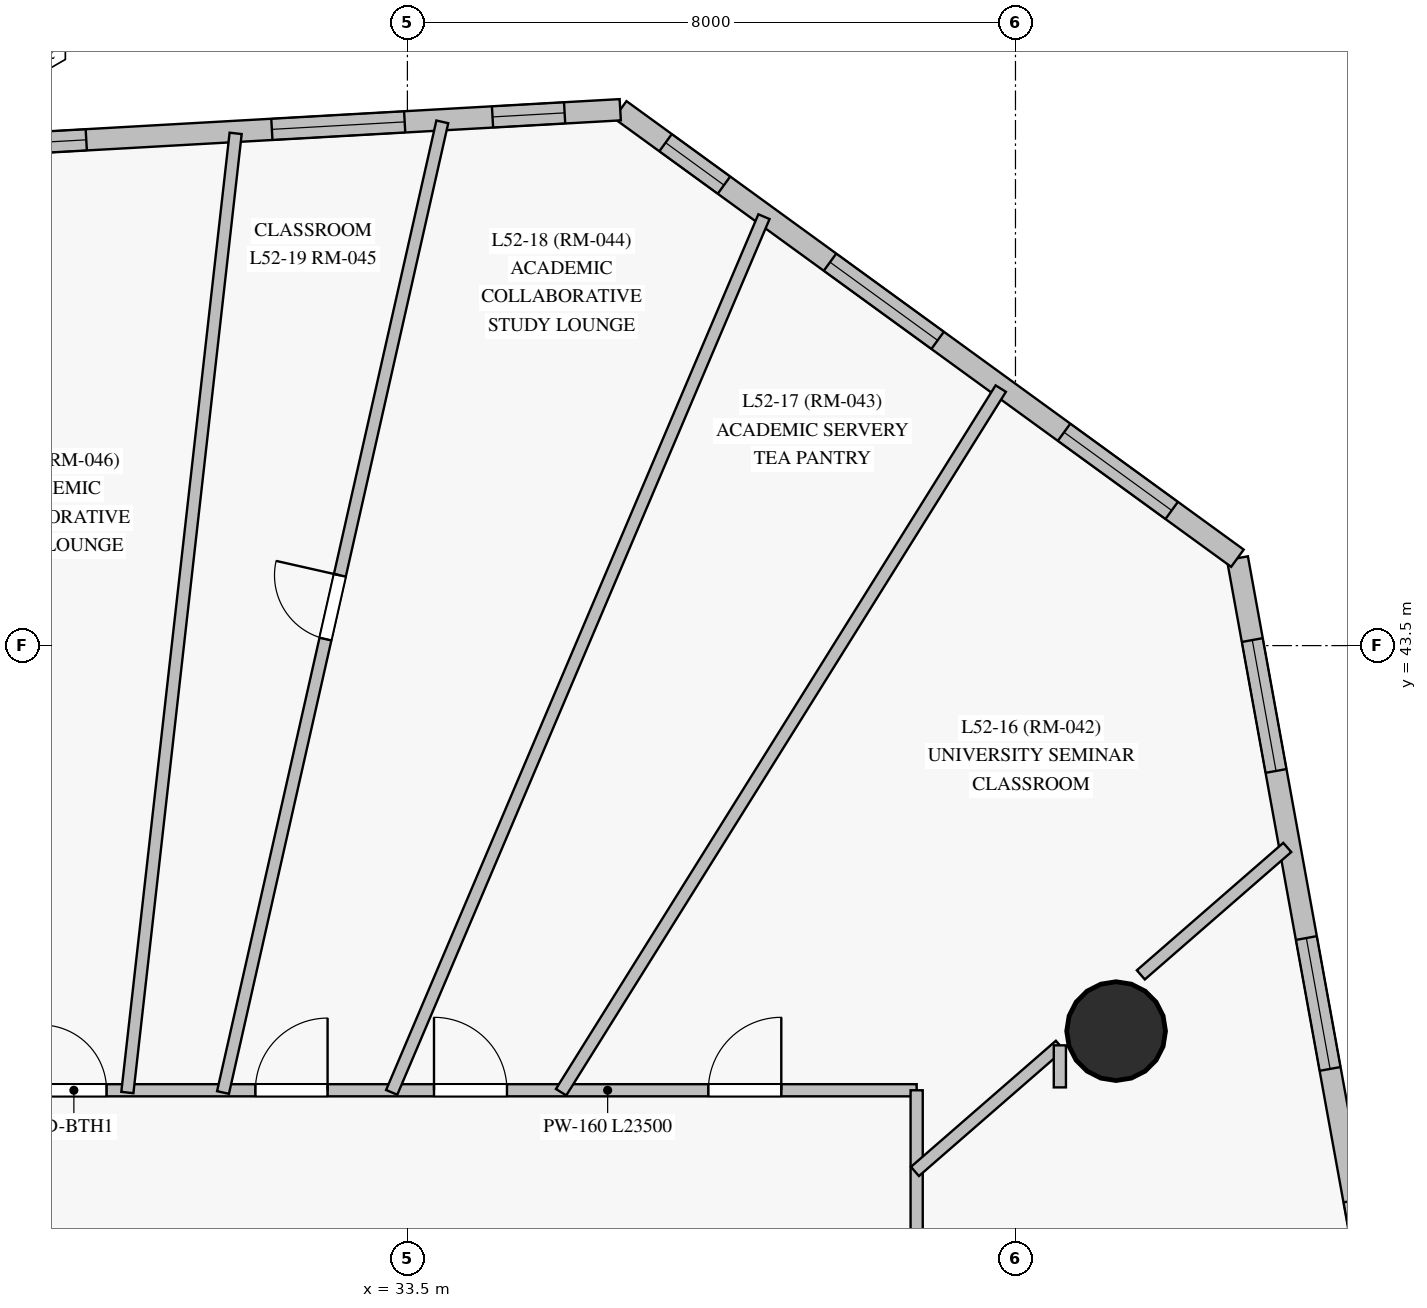
"""IFC4 building model, lengths in metres.
Left out: names, types, materials, properties, quantities, classifications, styles, units other than length and angle.
Written with IfcOpenShell. Run it as: python <this file> out.ifc"""

import sys

from ifc_helpers import new_model, si_unit, direction, frame, frame_2d, origin, origin_with_axes, origin_2d, place, context, subcontext, project, spatial, rectangle, circle, extrude, source, transform, mapped, element, fill, save


model = new_model("IFC4")
c1 = context("Model", 3, precision=1e-05, world=origin(), true_north=direction((0.0, 1.0)))
c2 = subcontext(c1, "Body", "Model", "MODEL_VIEW")
j1 = project(units=[si_unit("LENGTHUNIT", "METRE"), si_unit("PLANEANGLEUNIT", "RADIAN")], contexts=[c1])
p1 = place(None, origin())
s1 = spatial("IfcSite", under=j1, at=p1, CompositionType="ELEMENT")
p2 = place(p1, origin())
s2 = spatial("IfcBuilding", under=s1, at=p2, CompositionType="ELEMENT")
p3 = place(p2, frame((0.0, 0.0, 180.95)))
s3 = spatial("IfcBuildingStorey", under=s2, at=p3, CompositionType="ELEMENT", Elevation=180.95)
m1 = source(origin_with_axes(), c2, "Body", "SweptSolid", [
    extrude(circle(Radius=0.65, at=origin_2d()), origin(), (0.0, 0.0, 1.0), 3.05),
])
p4 = place(p3, frame((42.824, 38.428, 0.0), z_axis=(0.0, 0.0, 1.0), x_axis=(1.0, 0.0, 0.0)))
e1 = element("IfcColumn", 1, at=p4, inside=s3, PredefinedType="COLUMN", context=c2, shape_type="MappedRepresentation", body=[
    mapped(m1, transform((0.0, 0.0, 0.0), scale=1.0)),
])
p5 = place(p3, frame((46.966, 30.618, 0.0), z_axis=(0.0, 0.0, 1.0), x_axis=(-0.178507284688, 0.983938590214, 0.0)))
e2 = element("IfcWall", 2, at=p5, inside=s3, PredefinedType="SOLIDWALL", context=c2, shape_type="SweptSolid", body=[
    extrude(rectangle(XDim=14.261, YDim=0.28, at=frame_2d((7.13, 0.0))), origin(), (0.0, 0.0, 1.0), 2.825),
])
p6 = place(p5, frame((0.517, 0.0, 0.85)))
e3 = element("IfcOpeningElement", 3, at=p6, cuts=e2, PredefinedType="OPENING", context=c2, shape_type="SweptSolid", body=[
    extrude(rectangle(XDim=1.75, YDim=1.65, at=frame_2d((0.875, 0.825))), frame((0.0, 0.15, 0.0), z_axis=(0.0, -1.0, 0.0), x_axis=(1.0, 0.0, 0.0)), (0.0, 0.0, 1.0), 0.3),
])
p7 = place(p5, frame((3.923, 0.0, 0.85)))
e4 = element("IfcOpeningElement", 4, at=p7, cuts=e2, PredefinedType="OPENING", context=c2, shape_type="SweptSolid", body=[
    extrude(rectangle(XDim=1.75, YDim=1.65, at=frame_2d((0.875, 0.825))), frame((0.0, 0.15, 0.0), z_axis=(0.0, -1.0, 0.0), x_axis=(1.0, 0.0, 0.0)), (0.0, 0.0, 1.0), 0.3),
])
p8 = place(p5, frame((7.432, 0.0, 0.85)))
e5 = element("IfcOpeningElement", 5, at=p8, cuts=e2, PredefinedType="OPENING", context=c2, shape_type="SweptSolid", body=[
    extrude(rectangle(XDim=1.75, YDim=1.65, at=frame_2d((0.875, 0.825))), frame((0.0, 0.15, 0.0), z_axis=(0.0, -1.0, 0.0), x_axis=(1.0, 0.0, 0.0)), (0.0, 0.0, 1.0), 0.3),
])
p9 = place(p5, frame((11.416, 0.0, 0.85)))
e6 = element("IfcOpeningElement", 6, at=p9, cuts=e2, PredefinedType="OPENING", context=c2, shape_type="SweptSolid", body=[
    extrude(rectangle(XDim=1.75, YDim=1.65, at=frame_2d((0.875, 0.825))), frame((0.0, 0.15, 0.0), z_axis=(0.0, -1.0, 0.0), x_axis=(1.0, 0.0, 0.0)), (0.0, 0.0, 1.0), 0.3),
])
p10 = place(p3, frame((44.42, 44.65, 0.0), z_axis=(0.0, 0.0, 1.0), x_axis=(-0.808983194654, 0.587831770805, 0.0)))
e7 = element("IfcWall", 7, at=p10, inside=s3, PredefinedType="SOLIDWALL", context=c2, shape_type="SweptSolid", body=[
    extrude(rectangle(XDim=10.037, YDim=0.28, at=frame_2d((5.019, 0.0))), origin(), (0.0, 0.0, 1.0), 2.825),
])
p11 = place(p10, frame((1.069, 0.0, 0.85)))
e8 = element("IfcOpeningElement", 8, at=p11, cuts=e7, PredefinedType="OPENING", context=c2, shape_type="SweptSolid", body=[
    extrude(rectangle(XDim=1.75, YDim=1.65, at=frame_2d((0.875, 0.825))), frame((0.0, 0.15, 0.0), z_axis=(0.0, -1.0, 0.0), x_axis=(1.0, 0.0, 0.0)), (0.0, 0.0, 1.0), 0.3),
])
p12 = place(p10, frame((4.875, 0.0, 0.85)))
e9 = element("IfcOpeningElement", 9, at=p12, cuts=e7, PredefinedType="OPENING", context=c2, shape_type="SweptSolid", body=[
    extrude(rectangle(XDim=1.75, YDim=1.65, at=frame_2d((0.875, 0.825))), frame((0.0, 0.15, 0.0), z_axis=(0.0, -1.0, 0.0), x_axis=(1.0, 0.0, 0.0)), (0.0, 0.0, 1.0), 0.3),
])
p13 = place(p10, frame((8.35, 0.0, 0.85)))
e10 = element("IfcOpeningElement", 10, at=p13, cuts=e7, PredefinedType="OPENING", context=c2, shape_type="SweptSolid", body=[
    extrude(rectangle(XDim=0.95, YDim=1.5, at=frame_2d((0.475, 0.75))), frame((0.0, 0.15, 0.0), z_axis=(0.0, -1.0, 0.0), x_axis=(1.0, 0.0, 0.0)), (0.0, 0.0, 1.0), 0.3),
])
p14 = place(p3, frame((36.3, 50.55, 0.0), z_axis=(0.0, 0.0, 1.0), x_axis=(-0.998416329784, -0.056256843315, 0.0)))
e11 = element("IfcWall", 11, at=p14, inside=s3, PredefinedType="SOLIDWALL", context=c2, shape_type="SweptSolid", body=[
    extrude(rectangle(XDim=12.837, YDim=0.28, at=frame_2d((6.418, 0.0))), origin(), (0.0, 0.0, 1.0), 2.825),
])
p15 = place(p14, frame((0.733, 0.0, 0.85)))
e12 = element("IfcOpeningElement", 12, at=p15, cuts=e11, PredefinedType="OPENING", context=c2, shape_type="SweptSolid", body=[
    extrude(rectangle(XDim=0.95, YDim=1.5, at=frame_2d((0.475, 0.75))), frame((0.0, 0.15, 0.0), z_axis=(0.0, -1.0, 0.0), x_axis=(1.0, 0.0, 0.0)), (0.0, 0.0, 1.0), 0.3),
])
p16 = place(p14, frame((2.841, 0.0, 0.85)))
e13 = element("IfcOpeningElement", 13, at=p16, cuts=e11, PredefinedType="OPENING", context=c2, shape_type="SweptSolid", body=[
    extrude(rectangle(XDim=1.75, YDim=1.65, at=frame_2d((0.875, 0.825))), frame((0.0, 0.15, 0.0), z_axis=(0.0, -1.0, 0.0), x_axis=(1.0, 0.0, 0.0)), (0.0, 0.0, 1.0), 0.3),
])
p17 = place(p14, frame((7.036, 0.0, 0.85)))
e14 = element("IfcOpeningElement", 14, at=p17, cuts=e11, PredefinedType="OPENING", context=c2, shape_type="SweptSolid", body=[
    extrude(rectangle(XDim=1.75, YDim=1.65, at=frame_2d((0.875, 0.825))), frame((0.0, 0.15, 0.0), z_axis=(0.0, -1.0, 0.0), x_axis=(1.0, 0.0, 0.0)), (0.0, 0.0, 1.0), 0.3),
])
p18 = place(p3, frame((16.7, 37.65, 0.0), z_axis=(0.0, 0.0, 1.0), x_axis=(1.0, 0.0, 0.0)))
e15 = element("IfcWall", 15, at=p18, inside=s3, PredefinedType="PARTITIONING", context=c2, shape_type="SweptSolid", body=[
    extrude(rectangle(XDim=23.5, YDim=0.16, at=frame_2d((11.75, 0.0))), origin(), (0.0, 0.0, 1.0), 2.375),
])
p19 = place(p18, frame((20.759, 0.0, 0.0)))
e16 = element("IfcOpeningElement", 16, at=p19, cuts=e15, PredefinedType="OPENING", context=c2, shape_type="SweptSolid", body=[
    extrude(rectangle(XDim=0.96, YDim=2.15, at=frame_2d((0.48, 1.075))), frame((0.0, 0.09, 0.0), z_axis=(0.0, -1.0, 0.0), x_axis=(1.0, 0.0, 0.0)), (0.0, 0.0, 1.0), 0.18),
])
p20 = place(p18, frame((17.15, 0.0, 0.0)))
e17 = element("IfcOpeningElement", 17, at=p20, cuts=e15, PredefinedType="OPENING", context=c2, shape_type="SweptSolid", body=[
    extrude(rectangle(XDim=0.96, YDim=2.15, at=frame_2d((0.48, 1.075))), frame((0.0, 0.09, 0.0), z_axis=(0.0, -1.0, 0.0), x_axis=(1.0, 0.0, 0.0)), (0.0, 0.0, 1.0), 0.18),
])
p21 = place(p18, frame((14.8, 0.0, 0.0)))
e18 = element("IfcOpeningElement", 18, at=p21, cuts=e15, PredefinedType="OPENING", context=c2, shape_type="SweptSolid", body=[
    extrude(rectangle(XDim=0.95, YDim=2.15, at=frame_2d((0.475, 1.075))), frame((0.0, 0.09, 0.0), z_axis=(0.0, -1.0, 0.0), x_axis=(1.0, 0.0, 0.0)), (0.0, 0.0, 1.0), 0.18),
])
p22 = place(p18, frame((11.982, 0.0, 0.0)))
e19 = element("IfcOpeningElement", 19, at=p22, cuts=e15, PredefinedType="OPENING", context=c2, shape_type="SweptSolid", body=[
    extrude(rectangle(XDim=0.86, YDim=2.1, at=frame_2d((0.43, 1.05))), frame((0.0, 0.09, 0.0), z_axis=(0.0, -1.0, 0.0), x_axis=(1.0, 0.0, 0.0)), (0.0, 0.0, 1.0), 0.18),
])
p23 = place(p18, frame((10.885, 0.0, 0.0)))
e20 = element("IfcOpeningElement", 20, at=p23, cuts=e15, PredefinedType="OPENING", context=c2, shape_type="SweptSolid", body=[
    extrude(rectangle(XDim=0.95, YDim=2.15, at=frame_2d((0.475, 1.075))), frame((0.0, 0.09, 0.0), z_axis=(0.0, -1.0, 0.0), x_axis=(1.0, 0.0, 0.0)), (0.0, 0.0, 1.0), 0.18),
])
p24 = place(p18, frame((7.89, 0.0, 0.0)))
e21 = element("IfcOpeningElement", 21, at=p24, cuts=e15, PredefinedType="OPENING", context=c2, shape_type="SweptSolid", body=[
    extrude(rectangle(XDim=0.96, YDim=2.15, at=frame_2d((0.48, 1.075))), frame((0.0, 0.09, 0.0), z_axis=(0.0, -1.0, 0.0), x_axis=(1.0, 0.0, 0.0)), (0.0, 0.0, 1.0), 0.18),
])
p25 = place(p18, frame((5.4, 0.0, 0.0)))
e22 = element("IfcOpeningElement", 22, at=p25, cuts=e15, PredefinedType="OPENING", context=c2, shape_type="SweptSolid", body=[
    extrude(rectangle(XDim=0.96, YDim=2.15, at=frame_2d((0.48, 1.075))), frame((0.0, 0.09, 0.0), z_axis=(0.0, -1.0, 0.0), x_axis=(1.0, 0.0, 0.0)), (0.0, 0.0, 1.0), 0.18),
])
p26 = place(p18, frame((1.939, 0.0, 0.0)))
e23 = element("IfcOpeningElement", 23, at=p26, cuts=e15, PredefinedType="OPENING", context=c2, shape_type="SweptSolid", body=[
    extrude(rectangle(XDim=0.96, YDim=2.15, at=frame_2d((0.48, 1.075))), frame((0.0, 0.09, 0.0), z_axis=(0.0, -1.0, 0.0), x_axis=(1.0, 0.0, 0.0)), (0.0, 0.0, 1.0), 0.18),
])
p27 = place(p3, frame((40.2, 37.65, 0.0), z_axis=(0.0, 0.0, 1.0), x_axis=(0.0, -1.0, 0.0)))
e24 = element("IfcWall", 24, at=p27, inside=s3, PredefinedType="PARTITIONING", context=c2, shape_type="SweptSolid", body=[
    extrude(rectangle(XDim=22.3, YDim=0.16, at=frame_2d((11.15, 0.0))), origin(), (0.0, 0.0, 1.0), 2.375),
])
p28 = place(p27, frame((18.619, 0.0, 0.0)))
e25 = element("IfcOpeningElement", 25, at=p28, cuts=e24, PredefinedType="OPENING", context=c2, shape_type="SweptSolid", body=[
    extrude(rectangle(XDim=0.96, YDim=2.15, at=frame_2d((0.48, 1.075))), frame((0.0, 0.09, 0.0), z_axis=(0.0, -1.0, 0.0), x_axis=(1.0, 0.0, 0.0)), (0.0, 0.0, 1.0), 0.18),
])
p29 = place(p27, frame((16.25, 0.0, 0.0)))
e26 = element("IfcOpeningElement", 26, at=p29, cuts=e24, PredefinedType="OPENING", context=c2, shape_type="SweptSolid", body=[
    extrude(rectangle(XDim=0.96, YDim=2.15, at=frame_2d((0.48, 1.075))), frame((0.0, 0.09, 0.0), z_axis=(0.0, -1.0, 0.0), x_axis=(1.0, 0.0, 0.0)), (0.0, 0.0, 1.0), 0.18),
])
p30 = place(p27, frame((10.675, 0.0, 0.0)))
e27 = element("IfcOpeningElement", 27, at=p30, cuts=e24, PredefinedType="OPENING", context=c2, shape_type="SweptSolid", body=[
    extrude(rectangle(XDim=0.96, YDim=2.15, at=frame_2d((0.48, 1.075))), frame((0.0, 0.09, 0.0), z_axis=(0.0, -1.0, 0.0), x_axis=(1.0, 0.0, 0.0)), (0.0, 0.0, 1.0), 0.18),
])
p31 = place(p27, frame((7.33, 0.0, 0.0)))
e28 = element("IfcOpeningElement", 28, at=p31, cuts=e24, PredefinedType="OPENING", context=c2, shape_type="SweptSolid", body=[
    extrude(rectangle(XDim=0.96, YDim=2.15, at=frame_2d((0.48, 1.075))), frame((0.0, 0.09, 0.0), z_axis=(0.0, -1.0, 0.0), x_axis=(1.0, 0.0, 0.0)), (0.0, 0.0, 1.0), 0.18),
])
p32 = place(p27, frame((5.1, 0.0, 0.0)))
e29 = element("IfcOpeningElement", 29, at=p32, cuts=e24, PredefinedType="OPENING", context=c2, shape_type="SweptSolid", body=[
    extrude(rectangle(XDim=0.96, YDim=2.15, at=frame_2d((0.48, 1.075))), frame((0.0, 0.09, 0.0), z_axis=(0.0, -1.0, 0.0), x_axis=(1.0, 0.0, 0.0)), (0.0, 0.0, 1.0), 0.18),
])
p33 = place(p3, frame((31.074, 37.621, 0.0), z_axis=(0.0, 0.0, 1.0), x_axis=(0.220370767659, 0.975416180285, 0.0)))
e30 = element("IfcWall", 30, at=p33, inside=s3, PredefinedType="PARTITIONING", context=c2, shape_type="SweptSolid", body=[
    extrude(rectangle(XDim=13.092, YDim=0.16, at=frame_2d((6.546, 0.0))), origin(), (0.0, 0.0, 1.0), 2.825),
])
p34 = place(p33, frame((6.116, 0.0, 0.0)))
e31 = element("IfcOpeningElement", 31, at=p34, cuts=e30, PredefinedType="OPENING", context=c2, shape_type="SweptSolid", body=[
    extrude(rectangle(XDim=0.86, YDim=2.04, at=frame_2d((0.43, 1.02))), frame((0.0, 0.09, 0.0), z_axis=(0.0, -1.0, 0.0), x_axis=(1.0, 0.0, 0.0)), (0.0, 0.0, 1.0), 0.18),
])
p35 = place(p3, frame((29.816, 37.62, 0.0), z_axis=(0.0, 0.0, 1.0), x_axis=(0.112180638673, 0.993687830411, 0.0)))
e32 = element("IfcWall", 32, at=p35, inside=s3, PredefinedType="PARTITIONING", context=c2, shape_type="SweptSolid", body=[
    extrude(rectangle(XDim=12.699, YDim=0.16, at=frame_2d((6.349, 0.0))), origin(), (0.0, 0.0, 1.0), 2.825),
])
p36 = place(p3, frame((33.293, 37.622, 0.0), z_axis=(0.0, 0.0, 1.0), x_axis=(0.391217863874, 0.920298094633, 0.0)))
e33 = element("IfcWall", 33, at=p36, inside=s3, PredefinedType="PARTITIONING", context=c2, shape_type="SweptSolid", body=[
    extrude(rectangle(XDim=12.519, YDim=0.16, at=frame_2d((6.259, 0.0))), origin(), (0.0, 0.0, 1.0), 2.825),
])
p37 = place(p3, frame((35.522, 37.625, 0.0), z_axis=(0.0, 0.0, 1.0), x_axis=(0.529920527349, 0.848047306873, 0.0)))
e34 = element("IfcWall", 34, at=p37, inside=s3, PredefinedType="PARTITIONING", context=c2, shape_type="SweptSolid", body=[
    extrude(rectangle(XDim=10.915, YDim=0.16, at=frame_2d((5.458, 0.0))), origin(), (0.0, 0.0, 1.0), 2.825),
])
p38 = place(p3, frame((40.177, 36.582, 0.0), z_axis=(0.0, 0.0, 1.0), x_axis=(0.754339267737, 0.656484782116, 0.0)))
e35 = element("IfcWall", 35, at=p38, inside=s3, PredefinedType="PARTITIONING", context=c2, shape_type="SweptSolid", body=[
    extrude(rectangle(XDim=2.527, YDim=0.16, at=frame_2d((1.264, 0.0))), origin(), (0.0, 0.0, 1.0), 2.275),
])
p39 = place(p3, frame((43.149, 39.168, 0.0), z_axis=(0.0, 0.0, 1.0), x_axis=(0.754356442097, 0.656465047254, 0.0)))
e36 = element("IfcWall", 36, at=p39, inside=s3, PredefinedType="PARTITIONING", context=c2, shape_type="SweptSolid", body=[
    extrude(rectangle(XDim=2.554, YDim=0.16, at=frame_2d((1.277, 0.0))), origin(), (0.0, 0.0, 1.0), 2.825),
])
p40 = place(p3, frame((42.084, 38.241, 0.0), z_axis=(0.0, 0.0, 1.0), x_axis=(0.0, -1.0, 0.0)))
e37 = element("IfcWall", 37, at=p40, inside=s3, PredefinedType="PARTITIONING", context=c2, shape_type="SweptSolid", body=[
    extrude(rectangle(XDim=0.553, YDim=0.16, at=frame_2d((0.277, 0.0))), origin(), (0.0, 0.0, 1.0), 2.495),
])
m2 = source(origin_with_axes(), c2, "Body", "SweptSolid", [
    extrude(rectangle(XDim=1.75, YDim=1.65, at=frame_2d((0.875, 0.825))), frame((0.0, 0.03, 0.0), z_axis=(0.0, -1.0, 0.0), x_axis=(1.0, 0.0, 0.0)), (0.0, 0.0, 1.0), 0.06),
])
p41 = place(p8, origin())
e38 = element("IfcWindow", 38, at=p41, inside=s3, PartitioningType="SINGLE_PANEL", PredefinedType="WINDOW", context=c2, shape_type="MappedRepresentation", body=[
    mapped(m2, transform((0.0, 0.0, 0.0), scale=1.0)),
])
fill(e5, e38)
p42 = place(p9, origin())
e39 = element("IfcWindow", 39, at=p42, inside=s3, PartitioningType="SINGLE_PANEL", PredefinedType="WINDOW", context=c2, shape_type="MappedRepresentation", body=[
    mapped(m2, transform((0.0, 0.0, 0.0), scale=1.0)),
])
fill(e6, e39)
p43 = place(p11, origin())
e40 = element("IfcWindow", 40, at=p43, inside=s3, PartitioningType="SINGLE_PANEL", PredefinedType="WINDOW", context=c2, shape_type="MappedRepresentation", body=[
    mapped(m2, transform((0.0, 0.0, 0.0), scale=1.0)),
])
fill(e8, e40)
p44 = place(p12, origin())
e41 = element("IfcWindow", 41, at=p44, inside=s3, PartitioningType="SINGLE_PANEL", PredefinedType="WINDOW", context=c2, shape_type="MappedRepresentation", body=[
    mapped(m2, transform((0.0, 0.0, 0.0), scale=1.0)),
])
fill(e9, e41)
m3 = source(origin_with_axes(), c2, "Body", "SweptSolid", [
    extrude(rectangle(XDim=0.95, YDim=1.5, at=frame_2d((0.475, 0.75))), frame((0.0, 0.03, 0.0), z_axis=(0.0, -1.0, 0.0), x_axis=(1.0, 0.0, 0.0)), (0.0, 0.0, 1.0), 0.06),
])
p45 = place(p13, origin())
e42 = element("IfcWindow", 42, at=p45, inside=s3, PartitioningType="SINGLE_PANEL", PredefinedType="WINDOW", context=c2, shape_type="MappedRepresentation", body=[
    mapped(m3, transform((0.0, 0.0, 0.0), scale=1.0)),
])
fill(e10, e42)
p46 = place(p15, origin())
e43 = element("IfcWindow", 43, at=p46, inside=s3, PartitioningType="SINGLE_PANEL", PredefinedType="WINDOW", context=c2, shape_type="MappedRepresentation", body=[
    mapped(m3, transform((0.0, 0.0, 0.0), scale=1.0)),
])
fill(e12, e43)
p47 = place(p16, origin())
e44 = element("IfcWindow", 44, at=p47, inside=s3, PartitioningType="SINGLE_PANEL", PredefinedType="WINDOW", context=c2, shape_type="MappedRepresentation", body=[
    mapped(m2, transform((0.0, 0.0, 0.0), scale=1.0)),
])
fill(e13, e44)
p48 = place(p17, origin())
e45 = element("IfcWindow", 45, at=p48, inside=s3, PartitioningType="SINGLE_PANEL", PredefinedType="WINDOW", context=c2, shape_type="MappedRepresentation", body=[
    mapped(m2, transform((0.0, 0.0, 0.0), scale=1.0)),
])
fill(e14, e45)
m4 = source(origin_with_axes(), c2, "Body", "SweptSolid", [
    extrude(rectangle(XDim=0.96, YDim=2.15, at=frame_2d((0.48, 1.075))), frame((0.0, 0.025, 0.0), z_axis=(0.0, -1.0, 0.0), x_axis=(1.0, 0.0, 0.0)), (0.0, 0.0, 1.0), 0.05),
])
p49 = place(p19, origin())
e46 = element("IfcDoor", 46, at=p49, inside=s3, OperationType="SINGLE_SWING_RIGHT", PredefinedType="DOOR", context=c2, shape_type="MappedRepresentation", body=[
    mapped(m4, transform((0.0, 0.0, 0.0), scale=1.0)),
])
fill(e16, e46)
p50 = place(p20, origin())
e47 = element("IfcDoor", 47, at=p50, inside=s3, OperationType="SINGLE_SWING_LEFT", PredefinedType="DOOR", context=c2, shape_type="MappedRepresentation", body=[
    mapped(m4, transform((0.0, 0.0, 0.0), scale=1.0)),
])
fill(e17, e47)
m5 = source(origin_with_axes(), c2, "Body", "SweptSolid", [
    extrude(rectangle(XDim=0.95, YDim=2.15, at=frame_2d((0.475, 1.075))), frame((0.0, 0.025, 0.0), z_axis=(0.0, -1.0, 0.0), x_axis=(1.0, 0.0, 0.0)), (0.0, 0.0, 1.0), 0.05),
])
p51 = place(p21, origin())
e48 = element("IfcDoor", 48, at=p51, inside=s3, OperationType="SINGLE_SWING_RIGHT", PredefinedType="DOOR", context=c2, shape_type="MappedRepresentation", body=[
    mapped(m5, transform((0.0, 0.0, 0.0), scale=1.0)),
])
fill(e18, e48)
m6 = source(origin_with_axes(), c2, "Body", "SweptSolid", [
    extrude(rectangle(XDim=0.86, YDim=2.1, at=frame_2d((0.43, 1.05))), frame((0.0, 0.025, 0.0), z_axis=(0.0, -1.0, 0.0), x_axis=(1.0, 0.0, 0.0)), (0.0, 0.0, 1.0), 0.05),
])
p52 = place(p22, origin())
e49 = element("IfcDoor", 49, at=p52, inside=s3, OperationType="SINGLE_SWING_LEFT", PredefinedType="DOOR", context=c2, shape_type="MappedRepresentation", body=[
    mapped(m6, transform((0.0, 0.0, 0.0), scale=1.0)),
])
fill(e19, e49)
m7 = source(origin_with_axes(), c2, "Body", "SweptSolid", [
    extrude(rectangle(XDim=0.86, YDim=2.04, at=frame_2d((0.43, 1.02))), frame((0.0, 0.025, 0.0), z_axis=(0.0, -1.0, 0.0), x_axis=(1.0, 0.0, 0.0)), (0.0, 0.0, 1.0), 0.05),
])
p53 = place(p34, origin())
e50 = element("IfcDoor", 50, at=p53, inside=s3, OperationType="SINGLE_SWING_RIGHT", PredefinedType="DOOR", context=c2, shape_type="MappedRepresentation", body=[
    mapped(m7, transform((0.0, 0.0, 0.0), scale=1.0)),
])
fill(e31, e50)
save(model, sys.argv[1])
